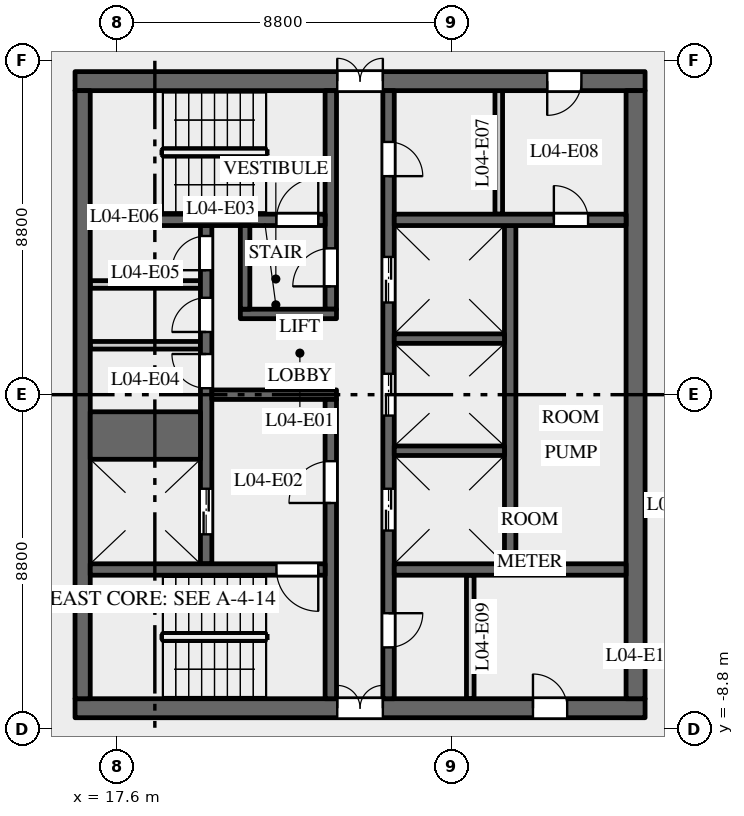
"""IFC4 building model, lengths in metres.
Left out: names, types, materials, properties, quantities, classifications, styles, units other than length and angle.
Written with IfcOpenShell. Run it as: python <this file> out.ifc"""

import sys

from ifc_helpers import new_model, si_unit, direction, frame, frame_2d, origin, place, context, subcontext, project, spatial, rectangle, extrude, element, fill, save


model = new_model("IFC4")
c1 = context("Model", 3, precision=1e-05, world=origin(), true_north=direction((0.0, 1.0)))
c2 = subcontext(c1, "Body", "Model", "MODEL_VIEW")
j1 = project(units=[si_unit("LENGTHUNIT", "METRE"), si_unit("PLANEANGLEUNIT", "RADIAN")], contexts=[c1])
p1 = place(None, origin())
s1 = spatial("IfcSite", under=j1, at=p1, CompositionType="ELEMENT")
p2 = place(p1, origin())
s2 = spatial("IfcBuilding", under=s1, at=p2, CompositionType="ELEMENT")
p3 = place(p2, frame((0.0, 0.0, 25.0)))
s3 = spatial("IfcBuildingStorey", under=s2, at=p3, CompositionType="ELEMENT", Elevation=25.0)
p4 = place(p3, frame((16.5, 8.25, 0.0), z_axis=(0.0, 0.0, 1.0), x_axis=(1.0, 0.0, 0.0)))
e1 = element("IfcWall", 1, at=p4, inside=s3, PredefinedType="SHEAR", context=c2, shape_type="SweptSolid", body=[
    extrude(rectangle(XDim=15.0, YDim=0.5, at=frame_2d((7.5, 0.0))), origin(), (0.0, 0.0, 1.0), 5.2),
])
p5 = place(p4, frame((6.9, 0.0, 0.0)))
e2 = element("IfcOpeningElement", 2, at=p5, cuts=e1, PredefinedType="OPENING", context=c2, shape_type="SweptSolid", body=[
    extrude(rectangle(XDim=1.2, YDim=2.1, at=frame_2d((0.6, 1.05))), frame((0.0, 0.26, 0.0), z_axis=(0.0, -1.0, 0.0), x_axis=(1.0, 0.0, 0.0)), (0.0, 0.0, 1.0), 0.52),
])
p6 = place(p4, frame((12.425, 0.0, 0.0)))
e3 = element("IfcOpeningElement", 3, at=p6, cuts=e1, PredefinedType="OPENING", context=c2, shape_type="SweptSolid", body=[
    extrude(rectangle(XDim=0.9, YDim=2.1, at=frame_2d((0.45, 1.05))), frame((0.0, 0.26, 0.0), z_axis=(0.0, -1.0, 0.0), x_axis=(1.0, 0.0, 0.0)), (0.0, 0.0, 1.0), 0.52),
])
p7 = place(p3, frame((16.5, -8.25, 0.0), z_axis=(0.0, 0.0, 1.0), x_axis=(1.0, 0.0, 0.0)))
e4 = element("IfcWall", 4, at=p7, inside=s3, PredefinedType="SHEAR", context=c2, shape_type="SweptSolid", body=[
    extrude(rectangle(XDim=15.0, YDim=0.5, at=frame_2d((7.5, 0.0))), origin(), (0.0, 0.0, 1.0), 5.2),
])
p8 = place(p7, frame((6.9, 0.0, 0.0)))
e5 = element("IfcOpeningElement", 5, at=p8, cuts=e4, PredefinedType="OPENING", context=c2, shape_type="SweptSolid", body=[
    extrude(rectangle(XDim=1.2, YDim=2.1, at=frame_2d((0.6, 1.05))), frame((0.0, 0.26, 0.0), z_axis=(0.0, -1.0, 0.0), x_axis=(1.0, 0.0, 0.0)), (0.0, 0.0, 1.0), 0.52),
])
p9 = place(p7, frame((12.05, 0.0, 0.0)))
e6 = element("IfcOpeningElement", 6, at=p9, cuts=e4, PredefinedType="OPENING", context=c2, shape_type="SweptSolid", body=[
    extrude(rectangle(XDim=0.9, YDim=2.1, at=frame_2d((0.45, 1.05))), frame((0.0, 0.26, 0.0), z_axis=(0.0, -1.0, 0.0), x_axis=(1.0, 0.0, 0.0)), (0.0, 0.0, 1.0), 0.52),
])
for number, where, z_axis, x_axis in (
    (7, (16.9, 1.3, 0.0), (0.0, 0.0, 1.0), (1.0, 0.0, 0.0)),
    (8, (16.9, 2.9, 0.0), (0.0, 0.0, 1.0), (1.0, 0.0, 0.0)),
):
    element("IfcWall", number, at=place(p3, frame(where, z_axis=z_axis, x_axis=x_axis)), inside=s3, PredefinedType="PARTITIONING", context=c2, shape_type="SweptSolid", body=[
        extrude(rectangle(XDim=2.9, YDim=0.2, at=frame_2d((1.45, 0.0))), origin(), (0.0, 0.0, 1.0), 5.2),
    ])
p10 = place(p3, frame((27.95, -4.45, 0.0), z_axis=(0.0, 0.0, 1.0), x_axis=(0.0, 1.0, 0.0)))
e9 = element("IfcWall", 9, at=p10, inside=s3, PredefinedType="SHEAR", context=c2, shape_type="SweptSolid", body=[
    extrude(rectangle(XDim=8.9, YDim=0.3, at=frame_2d((4.45, 0.0))), origin(), (0.0, 0.0, 1.0), 5.2),
])
p11 = place(p3, frame((19.95, -4.45, 0.0), z_axis=(0.0, 0.0, 1.0), x_axis=(0.0, 1.0, 0.0)))
e10 = element("IfcWall", 10, at=p11, inside=s3, PredefinedType="SHEAR", context=c2, shape_type="SweptSolid", body=[
    extrude(rectangle(XDim=8.9, YDim=0.3, at=frame_2d((4.45, 0.0))), origin(), (0.0, 0.0, 1.0), 5.2),
])
p12 = place(p11, frame((0.775, 0.0, 0.0)))
e11 = element("IfcOpeningElement", 11, at=p12, cuts=e10, PredefinedType="OPENING", context=c2, shape_type="SweptSolid", body=[
    extrude(rectangle(XDim=1.2, YDim=2.1, at=frame_2d((0.6, 1.05))), frame((0.0, 0.16, 0.0), z_axis=(0.0, -1.0, 0.0), x_axis=(1.0, 0.0, 0.0)), (0.0, 0.0, 1.0), 0.32),
])
p13 = place(p11, frame((4.62, 0.0, 0.0)))
e12 = element("IfcOpeningElement", 12, at=p13, cuts=e10, PredefinedType="OPENING", context=c2, shape_type="SweptSolid", body=[
    extrude(rectangle(XDim=0.9, YDim=2.1, at=frame_2d((0.45, 1.05))), frame((0.0, 0.16, 0.0), z_axis=(0.0, -1.0, 0.0), x_axis=(1.0, 0.0, 0.0)), (0.0, 0.0, 1.0), 0.32),
])
p14 = place(p11, frame((6.1, 0.0, 0.0)))
e13 = element("IfcOpeningElement", 13, at=p14, cuts=e10, PredefinedType="OPENING", context=c2, shape_type="SweptSolid", body=[
    extrude(rectangle(XDim=0.9, YDim=2.1, at=frame_2d((0.45, 1.05))), frame((0.0, 0.16, 0.0), z_axis=(0.0, -1.0, 0.0), x_axis=(1.0, 0.0, 0.0)), (0.0, 0.0, 1.0), 0.32),
])
p15 = place(p11, frame((7.725, 0.0, 0.0)))
e14 = element("IfcOpeningElement", 14, at=p15, cuts=e10, PredefinedType="OPENING", context=c2, shape_type="SweptSolid", body=[
    extrude(rectangle(XDim=0.9, YDim=2.1, at=frame_2d((0.45, 1.05))), frame((0.0, 0.16, 0.0), z_axis=(0.0, -1.0, 0.0), x_axis=(1.0, 0.0, 0.0)), (0.0, 0.0, 1.0), 0.32),
])
p16 = place(p3, frame((24.75, -8.0, 0.0), z_axis=(0.0, 0.0, 1.0), x_axis=(0.0, 1.0, 0.0)))
e15 = element("IfcWall", 15, at=p16, inside=s3, PredefinedType="SHEAR", context=c2, shape_type="SweptSolid", body=[
    extrude(rectangle(XDim=16.0, YDim=0.3, at=frame_2d((8.0, 0.0))), origin(), (0.0, 0.0, 1.0), 5.2),
])
p17 = place(p16, frame((4.425, 0.0, 0.0)))
e16 = element("IfcOpeningElement", 16, at=p17, cuts=e15, PredefinedType="OPENING", context=c2, shape_type="SweptSolid", body=[
    extrude(rectangle(XDim=1.1, YDim=2.1, at=frame_2d((0.55, 1.05))), frame((0.0, 0.16, 0.0), z_axis=(0.0, -1.0, 0.0), x_axis=(1.0, 0.0, 0.0)), (0.0, 0.0, 1.0), 0.32),
])
p18 = place(p16, frame((7.45, 0.0, 0.0)))
e17 = element("IfcOpeningElement", 17, at=p18, cuts=e15, PredefinedType="OPENING", context=c2, shape_type="SweptSolid", body=[
    extrude(rectangle(XDim=1.1, YDim=2.1, at=frame_2d((0.55, 1.05))), frame((0.0, 0.16, 0.0), z_axis=(0.0, -1.0, 0.0), x_axis=(1.0, 0.0, 0.0)), (0.0, 0.0, 1.0), 0.32),
])
p19 = place(p16, frame((10.425, 0.0, 0.0)))
e18 = element("IfcOpeningElement", 18, at=p19, cuts=e15, PredefinedType="OPENING", context=c2, shape_type="SweptSolid", body=[
    extrude(rectangle(XDim=1.2, YDim=2.1, at=frame_2d((0.6, 1.05))), frame((0.0, 0.16, 0.0), z_axis=(0.0, -1.0, 0.0), x_axis=(1.0, 0.0, 0.0)), (0.0, 0.0, 1.0), 0.32),
])
p20 = place(p16, frame((13.75, 0.0, 0.0)))
e19 = element("IfcOpeningElement", 19, at=p20, cuts=e15, PredefinedType="OPENING", context=c2, shape_type="SweptSolid", body=[
    extrude(rectangle(XDim=0.9, YDim=2.1, at=frame_2d((0.45, 1.05))), frame((0.0, 0.16, 0.0), z_axis=(0.0, -1.0, 0.0), x_axis=(1.0, 0.0, 0.0)), (0.0, 0.0, 1.0), 0.32),
])
p21 = place(p16, frame((1.35, 0.0, 0.0)))
e20 = element("IfcOpeningElement", 20, at=p21, cuts=e15, PredefinedType="OPENING", context=c2, shape_type="SweptSolid", body=[
    extrude(rectangle(XDim=0.9, YDim=2.1, at=frame_2d((0.45, 1.05))), frame((0.0, 0.16, 0.0), z_axis=(0.0, -1.0, 0.0), x_axis=(1.0, 0.0, 0.0)), (0.0, 0.0, 1.0), 0.32),
])
p22 = place(p3, frame((20.1, 0.0, 0.0), z_axis=(0.0, 0.0, 1.0), x_axis=(1.0, 0.0, 0.0)))
e21 = element("IfcWall", 21, at=p22, inside=s3, PredefinedType="SHEAR", context=c2, shape_type="SweptSolid", body=[
    extrude(rectangle(XDim=3.28, YDim=0.25, at=frame_2d((1.64, 0.0))), origin(), (0.0, 0.0, 1.0), 5.2),
])
p23 = place(p3, frame((16.7, -8.0, 0.0), z_axis=(0.0, 0.0, 1.0), x_axis=(0.0, 1.0, 0.0)))
e22 = element("IfcWall", 22, at=p23, inside=s3, PredefinedType="SHEAR", context=c2, shape_type="SweptSolid", body=[
    extrude(rectangle(XDim=16.0, YDim=0.4, at=frame_2d((8.0, 0.0))), origin(), (0.0, 0.0, 1.0), 5.2),
])
p24 = place(p3, frame((31.25, -8.0, 0.0), z_axis=(0.0, 0.0, 1.0), x_axis=(0.0, 1.0, 0.0)))
e23 = element("IfcWall", 23, at=p24, inside=s3, PredefinedType="SHEAR", context=c2, shape_type="SweptSolid", body=[
    extrude(rectangle(XDim=16.0, YDim=0.5, at=frame_2d((8.0, 0.0))), origin(), (0.0, 0.0, 1.0), 5.2),
])
p25 = place(p3, frame((24.9, 4.6, 0.0), z_axis=(0.0, 0.0, 1.0), x_axis=(1.0, 0.0, 0.0)))
e24 = element("IfcWall", 24, at=p25, inside=s3, PredefinedType="SHEAR", context=c2, shape_type="SweptSolid", body=[
    extrude(rectangle(XDim=6.1, YDim=0.3, at=frame_2d((3.05, 0.0))), origin(), (0.0, 0.0, 1.0), 5.2),
])
p26 = place(p25, frame((4.2, 0.0, 0.0)))
e25 = element("IfcOpeningElement", 25, at=p26, cuts=e24, PredefinedType="OPENING", context=c2, shape_type="SweptSolid", body=[
    extrude(rectangle(XDim=0.9, YDim=2.1, at=frame_2d((0.45, 1.05))), frame((0.0, 0.16, 0.0), z_axis=(0.0, -1.0, 0.0), x_axis=(1.0, 0.0, 0.0)), (0.0, 0.0, 1.0), 0.32),
])
for number, where, z_axis, x_axis in (
    (26, (27.65, 4.75, 0.0), (0.0, 0.0, 1.0), (0.0, 1.0, 0.0)),
    (27, (26.9, -8.0, 0.0), (0.0, 0.0, 1.0), (0.0, 1.0, 0.0)),
):
    element("IfcWall", number, at=place(p3, frame(where, z_axis=z_axis, x_axis=x_axis)), inside=s3, PredefinedType="PARTITIONING", context=c2, shape_type="SweptSolid", body=[
        extrude(rectangle(XDim=3.25, YDim=0.2, at=frame_2d((1.625, 0.0))), origin(), (0.0, 0.0, 1.0), 5.2),
    ])
p27 = place(p3, frame((24.9, -4.6, 0.0), z_axis=(0.0, 0.0, 1.0), x_axis=(1.0, 0.0, 0.0)))
e28 = element("IfcWall", 28, at=p27, inside=s3, PredefinedType="SHEAR", context=c2, shape_type="SweptSolid", body=[
    extrude(rectangle(XDim=6.1, YDim=0.3, at=frame_2d((3.05, 0.0))), origin(), (0.0, 0.0, 1.0), 5.2),
])
p28 = place(p3, frame((16.9, -1.075, 0.0), z_axis=(0.0, 0.0, 1.0), x_axis=(1.0, 0.0, 0.0)))
e29 = element("IfcWall", 29, at=p28, inside=s3, PredefinedType="SHEAR", context=c2, shape_type="SweptSolid", body=[
    extrude(rectangle(XDim=2.9, YDim=1.25, at=frame_2d((1.45, 0.0))), origin(), (0.0, 0.0, 1.0), 5.2),
])
for number, where, z_axis, x_axis in (
    (30, (24.9, -1.475, 0.0), (0.0, 0.0, 1.0), (1.0, 0.0, 0.0)),
    (31, (24.9, 1.475, 0.0), (0.0, 0.0, 1.0), (1.0, 0.0, 0.0)),
):
    element("IfcWall", number, at=place(p3, frame(where, z_axis=z_axis, x_axis=x_axis)), inside=s3, PredefinedType="SHEAR", context=c2, shape_type="SweptSolid", body=[
        extrude(rectangle(XDim=2.9, YDim=0.25, at=frame_2d((1.45, 0.0))), origin(), (0.0, 0.0, 1.0), 5.2),
    ])
p29 = place(p3, frame((23.23, 2.25, 0.0), z_axis=(0.0, 0.0, 1.0), x_axis=(0.0, 1.0, 0.0)))
e32 = element("IfcWall", 32, at=p29, inside=s3, PredefinedType="SHEAR", context=c2, shape_type="SweptSolid", body=[
    extrude(rectangle(XDim=5.75, YDim=0.3, at=frame_2d((2.875, 0.0))), origin(), (0.0, 0.0, 1.0), 5.2),
])
p30 = place(p29, frame((0.6, 0.0, 0.0)))
e33 = element("IfcOpeningElement", 33, at=p30, cuts=e32, PredefinedType="OPENING", context=c2, shape_type="SweptSolid", body=[
    extrude(rectangle(XDim=1.0, YDim=2.1, at=frame_2d((0.5, 1.05))), frame((0.0, 0.16, 0.0), z_axis=(0.0, -1.0, 0.0), x_axis=(1.0, 0.0, 0.0)), (0.0, 0.0, 1.0), 0.32),
])
p31 = place(p3, frame((23.23, -8.0, 0.0), z_axis=(0.0, 0.0, 1.0), x_axis=(0.0, 1.0, 0.0)))
e34 = element("IfcWall", 34, at=p31, inside=s3, PredefinedType="SHEAR", context=c2, shape_type="SweptSolid", body=[
    extrude(rectangle(XDim=7.875, YDim=0.3, at=frame_2d((3.938, 0.0))), origin(), (0.0, 0.0, 1.0), 5.2),
])
p32 = place(p31, frame((5.15, 0.0, 0.0)))
e35 = element("IfcOpeningElement", 35, at=p32, cuts=e34, PredefinedType="OPENING", context=c2, shape_type="SweptSolid", body=[
    extrude(rectangle(XDim=1.1, YDim=2.1, at=frame_2d((0.55, 1.05))), frame((0.0, 0.16, 0.0), z_axis=(0.0, -1.0, 0.0), x_axis=(1.0, 0.0, 0.0)), (0.0, 0.0, 1.0), 0.32),
])
p33 = place(p3, frame((16.9, 4.6, 0.0), z_axis=(0.0, 0.0, 1.0), x_axis=(1.0, 0.0, 0.0)))
e36 = element("IfcWall", 36, at=p33, inside=s3, PredefinedType="SHEAR", context=c2, shape_type="SweptSolid", body=[
    extrude(rectangle(XDim=6.18, YDim=0.3, at=frame_2d((3.09, 0.0))), origin(), (0.0, 0.0, 1.0), 5.2),
])
p34 = place(p33, frame((4.9, 0.0, 0.0)))
e37 = element("IfcOpeningElement", 37, at=p34, cuts=e36, PredefinedType="OPENING", context=c2, shape_type="SweptSolid", body=[
    extrude(rectangle(XDim=1.1, YDim=2.1, at=frame_2d((0.55, 1.05))), frame((0.0, 0.16, 0.0), z_axis=(0.0, -1.0, 0.0), x_axis=(1.0, 0.0, 0.0)), (0.0, 0.0, 1.0), 0.32),
])
p35 = place(p3, frame((16.9, -4.6, 0.0), z_axis=(0.0, 0.0, 1.0), x_axis=(1.0, 0.0, 0.0)))
e38 = element("IfcWall", 38, at=p35, inside=s3, PredefinedType="SHEAR", context=c2, shape_type="SweptSolid", body=[
    extrude(rectangle(XDim=6.18, YDim=0.3, at=frame_2d((3.09, 0.0))), origin(), (0.0, 0.0, 1.0), 5.2),
])
p36 = place(p35, frame((4.9, 0.0, 0.0)))
e39 = element("IfcOpeningElement", 39, at=p36, cuts=e38, PredefinedType="OPENING", context=c2, shape_type="SweptSolid", body=[
    extrude(rectangle(XDim=1.1, YDim=2.1, at=frame_2d((0.55, 1.05))), frame((0.0, 0.16, 0.0), z_axis=(0.0, -1.0, 0.0), x_axis=(1.0, 0.0, 0.0)), (0.0, 0.0, 1.0), 0.32),
])
p37 = place(p3, frame((20.85, 2.125, 0.0), z_axis=(0.0, 0.0, 1.0), x_axis=(1.0, 0.0, 0.0)))
e40 = element("IfcWall", 40, at=p37, inside=s3, PredefinedType="SHEAR", context=c2, shape_type="SweptSolid", body=[
    extrude(rectangle(XDim=2.53, YDim=0.25, at=frame_2d((1.265, 0.0))), origin(), (0.0, 0.0, 1.0), 5.2),
])
p38 = place(p3, frame((20.975, 2.25, 0.0), z_axis=(0.0, 0.0, 1.0), x_axis=(0.0, 1.0, 0.0)))
e41 = element("IfcWall", 41, at=p38, inside=s3, PredefinedType="SHEAR", context=c2, shape_type="SweptSolid", body=[
    extrude(rectangle(XDim=2.2, YDim=0.25, at=frame_2d((1.1, 0.0))), origin(), (0.0, 0.0, 1.0), 5.2),
])
p39 = place(p12, origin())
e42 = element("IfcDoor", 42, at=p39, inside=s3, OperationType="DOUBLE_DOOR_SLIDING", PredefinedType="DOOR", context=c2, shape_type="SweptSolid", body=[
    extrude(rectangle(XDim=1.2, YDim=2.1, at=frame_2d((0.6, 1.05))), frame((0.0, 0.025, 0.0), z_axis=(0.0, -1.0, 0.0), x_axis=(1.0, 0.0, 0.0)), (0.0, 0.0, 1.0), 0.05),
])
fill(e11, e42)
p40 = place(p17, origin())
e43 = element("IfcDoor", 43, at=p40, inside=s3, OperationType="DOUBLE_DOOR_SLIDING", PredefinedType="DOOR", context=c2, shape_type="SweptSolid", body=[
    extrude(rectangle(XDim=1.1, YDim=2.1, at=frame_2d((0.55, 1.05))), frame((0.0, 0.025, 0.0), z_axis=(0.0, -1.0, 0.0), x_axis=(1.0, 0.0, 0.0)), (0.0, 0.0, 1.0), 0.05),
])
fill(e16, e43)
p41 = place(p18, origin())
e44 = element("IfcDoor", 44, at=p41, inside=s3, OperationType="DOUBLE_DOOR_SLIDING", PredefinedType="DOOR", context=c2, shape_type="SweptSolid", body=[
    extrude(rectangle(XDim=1.1, YDim=2.1, at=frame_2d((0.55, 1.05))), frame((0.0, 0.025, 0.0), z_axis=(0.0, -1.0, 0.0), x_axis=(1.0, 0.0, 0.0)), (0.0, 0.0, 1.0), 0.05),
])
fill(e17, e44)
p42 = place(p19, origin())
e45 = element("IfcDoor", 45, at=p42, inside=s3, OperationType="DOUBLE_DOOR_SLIDING", PredefinedType="DOOR", context=c2, shape_type="SweptSolid", body=[
    extrude(rectangle(XDim=1.2, YDim=2.1, at=frame_2d((0.6, 1.05))), frame((0.0, 0.025, 0.0), z_axis=(0.0, -1.0, 0.0), x_axis=(1.0, 0.0, 0.0)), (0.0, 0.0, 1.0), 0.05),
])
fill(e18, e45)
p43 = place(p34, origin())
e46 = element("IfcDoor", 46, at=p43, inside=s3, OperationType="SINGLE_SWING_LEFT", PredefinedType="DOOR", context=c2, shape_type="SweptSolid", body=[
    extrude(rectangle(XDim=1.1, YDim=2.1, at=frame_2d((0.55, 1.05))), frame((0.0, 0.025, 0.0), z_axis=(0.0, -1.0, 0.0), x_axis=(1.0, 0.0, 0.0)), (0.0, 0.0, 1.0), 0.05),
])
fill(e37, e46)
p44 = place(p36, origin())
e47 = element("IfcDoor", 47, at=p44, inside=s3, OperationType="SINGLE_SWING_RIGHT", PredefinedType="DOOR", context=c2, shape_type="SweptSolid", body=[
    extrude(rectangle(XDim=1.1, YDim=2.1, at=frame_2d((0.55, 1.05))), frame((0.0, 0.025, 0.0), z_axis=(0.0, -1.0, 0.0), x_axis=(1.0, 0.0, 0.0)), (0.0, 0.0, 1.0), 0.05),
])
fill(e39, e47)
p45 = place(p32, origin())
e48 = element("IfcDoor", 48, at=p45, inside=s3, OperationType="SINGLE_SWING_RIGHT", PredefinedType="DOOR", context=c2, shape_type="SweptSolid", body=[
    extrude(rectangle(XDim=1.1, YDim=2.1, at=frame_2d((0.55, 1.05))), frame((0.0, 0.025, 0.0), z_axis=(0.0, -1.0, 0.0), x_axis=(1.0, 0.0, 0.0)), (0.0, 0.0, 1.0), 0.05),
])
fill(e35, e48)
p46 = place(p30, origin())
e49 = element("IfcDoor", 49, at=p46, inside=s3, OperationType="SINGLE_SWING_RIGHT", PredefinedType="DOOR", context=c2, shape_type="SweptSolid", body=[
    extrude(rectangle(XDim=1.0, YDim=2.1, at=frame_2d((0.5, 1.05))), frame((0.0, 0.025, 0.0), z_axis=(0.0, -1.0, 0.0), x_axis=(1.0, 0.0, 0.0)), (0.0, 0.0, 1.0), 0.05),
])
fill(e33, e49)
p47 = place(p5, origin())
e50 = element("IfcDoor", 50, at=p47, inside=s3, OperationType="DOUBLE_DOOR_DOUBLE_SWING", PredefinedType="DOOR", context=c2, shape_type="SweptSolid", body=[
    extrude(rectangle(XDim=1.2, YDim=2.1, at=frame_2d((0.6, 1.05))), frame((0.0, 0.025, 0.0), z_axis=(0.0, -1.0, 0.0), x_axis=(1.0, 0.0, 0.0)), (0.0, 0.0, 1.0), 0.05),
])
fill(e2, e50)
p48 = place(p8, origin())
e51 = element("IfcDoor", 51, at=p48, inside=s3, OperationType="DOUBLE_DOOR_DOUBLE_SWING", PredefinedType="DOOR", context=c2, shape_type="SweptSolid", body=[
    extrude(rectangle(XDim=1.2, YDim=2.1, at=frame_2d((0.6, 1.05))), frame((0.0, 0.025, 0.0), z_axis=(0.0, -1.0, 0.0), x_axis=(1.0, 0.0, 0.0)), (0.0, 0.0, 1.0), 0.05),
])
fill(e5, e51)
p49 = place(p13, origin())
e52 = element("IfcDoor", 52, at=p49, inside=s3, OperationType="SINGLE_SWING_LEFT", PredefinedType="DOOR", context=c2, shape_type="SweptSolid", body=[
    extrude(rectangle(XDim=0.9, YDim=2.1, at=frame_2d((0.45, 1.05))), frame((0.0, 0.025, 0.0), z_axis=(0.0, -1.0, 0.0), x_axis=(1.0, 0.0, 0.0)), (0.0, 0.0, 1.0), 0.05),
])
fill(e12, e52)
p50 = place(p14, origin())
e53 = element("IfcDoor", 53, at=p50, inside=s3, OperationType="SINGLE_SWING_RIGHT", PredefinedType="DOOR", context=c2, shape_type="SweptSolid", body=[
    extrude(rectangle(XDim=0.9, YDim=2.1, at=frame_2d((0.45, 1.05))), frame((0.0, 0.025, 0.0), z_axis=(0.0, -1.0, 0.0), x_axis=(1.0, 0.0, 0.0)), (0.0, 0.0, 1.0), 0.05),
])
fill(e13, e53)
p51 = place(p15, origin())
e54 = element("IfcDoor", 54, at=p51, inside=s3, OperationType="SINGLE_SWING_RIGHT", PredefinedType="DOOR", context=c2, shape_type="SweptSolid", body=[
    extrude(rectangle(XDim=0.9, YDim=2.1, at=frame_2d((0.45, 1.05))), frame((0.0, 0.025, 0.0), z_axis=(0.0, -1.0, 0.0), x_axis=(1.0, 0.0, 0.0)), (0.0, 0.0, 1.0), 0.05),
])
fill(e14, e54)
p52 = place(p20, origin())
e55 = element("IfcDoor", 55, at=p52, inside=s3, OperationType="SINGLE_SWING_LEFT", PredefinedType="DOOR", context=c2, shape_type="SweptSolid", body=[
    extrude(rectangle(XDim=0.9, YDim=2.1, at=frame_2d((0.45, 1.05))), frame((0.0, 0.025, 0.0), z_axis=(0.0, -1.0, 0.0), x_axis=(1.0, 0.0, 0.0)), (0.0, 0.0, 1.0), 0.05),
])
fill(e19, e55)
p53 = place(p6, origin())
e56 = element("IfcDoor", 56, at=p53, inside=s3, OperationType="SINGLE_SWING_LEFT", PredefinedType="DOOR", context=c2, shape_type="SweptSolid", body=[
    extrude(rectangle(XDim=0.9, YDim=2.1, at=frame_2d((0.45, 1.05))), frame((0.0, 0.025, 0.0), z_axis=(0.0, -1.0, 0.0), x_axis=(1.0, 0.0, 0.0)), (0.0, 0.0, 1.0), 0.05),
])
fill(e3, e56)
p54 = place(p21, origin())
e57 = element("IfcDoor", 57, at=p54, inside=s3, OperationType="SINGLE_SWING_RIGHT", PredefinedType="DOOR", context=c2, shape_type="SweptSolid", body=[
    extrude(rectangle(XDim=0.9, YDim=2.1, at=frame_2d((0.45, 1.05))), frame((0.0, 0.025, 0.0), z_axis=(0.0, -1.0, 0.0), x_axis=(1.0, 0.0, 0.0)), (0.0, 0.0, 1.0), 0.05),
])
fill(e20, e57)
p55 = place(p9, origin())
e58 = element("IfcDoor", 58, at=p55, inside=s3, OperationType="SINGLE_SWING_RIGHT", PredefinedType="DOOR", context=c2, shape_type="SweptSolid", body=[
    extrude(rectangle(XDim=0.9, YDim=2.1, at=frame_2d((0.45, 1.05))), frame((0.0, 0.025, 0.0), z_axis=(0.0, -1.0, 0.0), x_axis=(1.0, 0.0, 0.0)), (0.0, 0.0, 1.0), 0.05),
])
fill(e6, e58)
p56 = place(p26, origin())
e59 = element("IfcDoor", 59, at=p56, inside=s3, OperationType="SINGLE_SWING_RIGHT", PredefinedType="DOOR", context=c2, shape_type="SweptSolid", body=[
    extrude(rectangle(XDim=0.9, YDim=2.1, at=frame_2d((0.45, 1.05))), frame((0.0, 0.025, 0.0), z_axis=(0.0, -1.0, 0.0), x_axis=(1.0, 0.0, 0.0)), (0.0, 0.0, 1.0), 0.05),
])
fill(e25, e59)
save(model, sys.argv[1])
